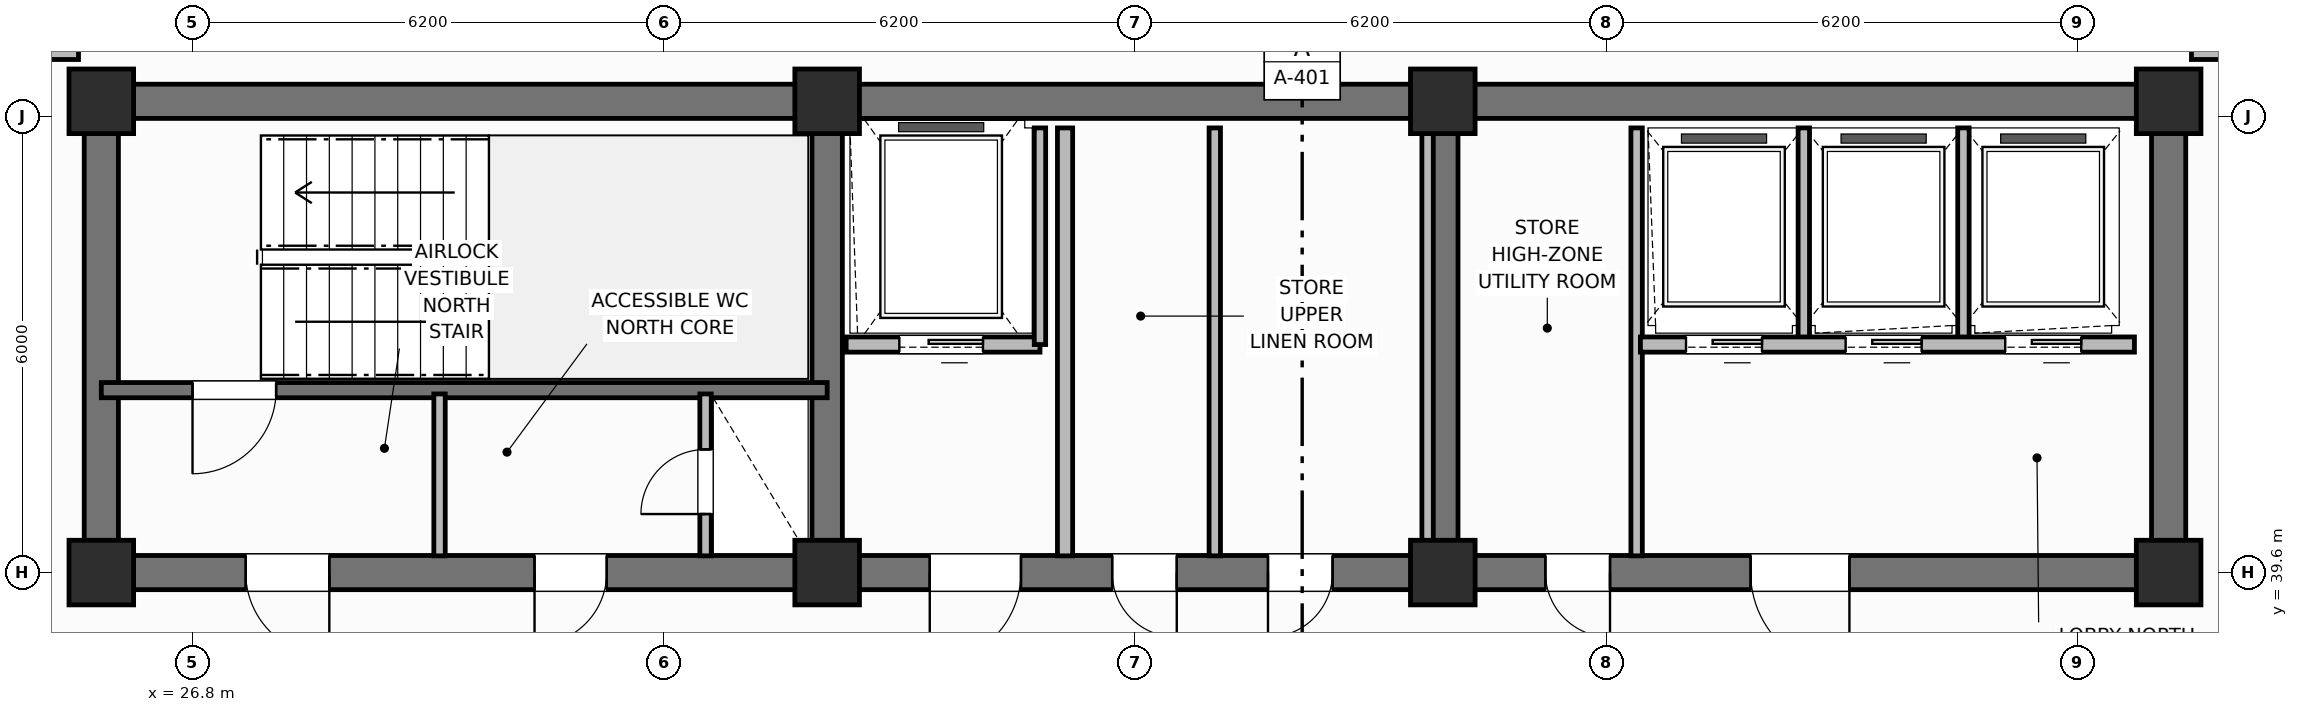
"""IFC4 building model, lengths in metres.
Left out: names, types, materials, properties, quantities, classifications, styles, units other than length and angle.
Written with IfcOpenShell. Run it as: python <this file> out.ifc"""

import sys

from ifc_helpers import new_model, si_unit, direction, frame, frame_2d, origin, origin_2d, place, context, subcontext, project, spatial, rectangle, extrude, element, fill, save


model = new_model("IFC4")
c1 = context("Model", 3, precision=1e-05, world=origin(), true_north=direction((0.0, 1.0)))
c2 = subcontext(c1, "Body", "Model", "MODEL_VIEW")
j1 = project(units=[si_unit("LENGTHUNIT", "METRE"), si_unit("PLANEANGLEUNIT", "RADIAN")], contexts=[c1])
p1 = place(None, origin())
s1 = spatial("IfcSite", under=j1, at=p1, CompositionType="ELEMENT")
p2 = place(p1, origin())
s2 = spatial("IfcBuilding", under=s1, at=p2, CompositionType="ELEMENT")
p3 = place(p2, frame((0.0, 0.0, 251.7)))
s3 = spatial("IfcBuildingStorey", under=s2, at=p3, CompositionType="ELEMENT", Elevation=251.7)
p4 = place(p3, frame((25.6, 45.8, 0.0), z_axis=(0.0, 0.0, 1.0), x_axis=(1.0, 0.0, 0.0)))
e1 = element("IfcWall", 1, at=p4, inside=s3, PredefinedType="SHEAR", context=c2, shape_type="SweptSolid", body=[
    extrude(rectangle(XDim=27.2, YDim=0.45, at=frame_2d((13.6, 0.0))), origin(), (0.0, 0.0, 1.0), 3.7),
])
for number, where, z_axis, x_axis in (
    (2, (25.6, 39.825, 0.0), (0.0, 0.0, 1.0), (0.0, 1.0, 0.0)),
    (3, (52.8, 39.825, 0.0), (0.0, 0.0, 1.0), (0.0, 1.0, 0.0)),
):
    element("IfcWall", number, at=place(p3, frame(where, z_axis=z_axis, x_axis=x_axis)), inside=s3, PredefinedType="SHEAR", context=c2, shape_type="SweptSolid", body=[
        extrude(rectangle(XDim=5.75, YDim=0.45, at=frame_2d((2.875, 0.0))), origin(), (0.0, 0.0, 1.0), 3.7),
    ])
p5 = place(p3, frame((52.8, 39.6, 0.0), z_axis=(0.0, 0.0, 1.0), x_axis=(-1.0, 0.0, 0.0)))
e4 = element("IfcWall", 4, at=p5, inside=s3, PredefinedType="SHEAR", context=c2, shape_type="SweptSolid", body=[
    extrude(rectangle(XDim=27.2, YDim=0.45, at=frame_2d((13.6, 0.0))), origin(), (0.0, 0.0, 1.0), 3.7),
])
p6 = place(p5, frame((24.2, 0.0, 0.0)))
e5 = element("IfcOpeningElement", 5, at=p6, cuts=e4, PredefinedType="OPENING", context=c2, shape_type="SweptSolid", body=[
    extrude(rectangle(XDim=1.1, YDim=2.15, at=frame_2d((0.55, 1.075))), frame((0.0, 0.235, 0.0), z_axis=(0.0, -1.0, 0.0), x_axis=(1.0, 0.0, 0.0)), (0.0, 0.0, 1.0), 0.47),
])
p7 = place(p5, frame((20.55, 0.0, 0.0)))
e6 = element("IfcOpeningElement", 6, at=p7, cuts=e4, PredefinedType="OPENING", context=c2, shape_type="SweptSolid", body=[
    extrude(rectangle(XDim=0.95, YDim=2.1, at=frame_2d((0.475, 1.05))), frame((0.0, 0.235, 0.0), z_axis=(0.0, -1.0, 0.0), x_axis=(1.0, 0.0, 0.0)), (0.0, 0.0, 1.0), 0.47),
])
p8 = place(p5, frame((15.1, 0.0, 0.0)))
e7 = element("IfcOpeningElement", 7, at=p8, cuts=e4, PredefinedType="OPENING", context=c2, shape_type="SweptSolid", body=[
    extrude(rectangle(XDim=1.2, YDim=2.15, at=frame_2d((0.6, 1.075))), frame((0.0, 0.235, 0.0), z_axis=(0.0, -1.0, 0.0), x_axis=(1.0, 0.0, 0.0)), (0.0, 0.0, 1.0), 0.47),
])
p9 = place(p5, frame((13.05, 0.0, 0.0)))
e8 = element("IfcOpeningElement", 8, at=p9, cuts=e4, PredefinedType="OPENING", context=c2, shape_type="SweptSolid", body=[
    extrude(rectangle(XDim=0.85, YDim=2.1, at=frame_2d((0.425, 1.05))), frame((0.0, 0.235, 0.0), z_axis=(0.0, -1.0, 0.0), x_axis=(1.0, 0.0, 0.0)), (0.0, 0.0, 1.0), 0.47),
])
p10 = place(p5, frame((11.0, 0.0, 0.0)))
e9 = element("IfcOpeningElement", 9, at=p10, cuts=e4, PredefinedType="OPENING", context=c2, shape_type="SweptSolid", body=[
    extrude(rectangle(XDim=0.85, YDim=2.1, at=frame_2d((0.425, 1.05))), frame((0.0, 0.235, 0.0), z_axis=(0.0, -1.0, 0.0), x_axis=(1.0, 0.0, 0.0)), (0.0, 0.0, 1.0), 0.47),
])
p11 = place(p5, frame((7.35, 0.0, 0.0)))
e10 = element("IfcOpeningElement", 10, at=p11, cuts=e4, PredefinedType="OPENING", context=c2, shape_type="SweptSolid", body=[
    extrude(rectangle(XDim=0.85, YDim=2.1, at=frame_2d((0.425, 1.05))), frame((0.0, 0.235, 0.0), z_axis=(0.0, -1.0, 0.0), x_axis=(1.0, 0.0, 0.0)), (0.0, 0.0, 1.0), 0.47),
])
p12 = place(p5, frame((4.2, 0.0, 0.0)))
e11 = element("IfcOpeningElement", 11, at=p12, cuts=e4, PredefinedType="OPENING", context=c2, shape_type="SweptSolid", body=[
    extrude(rectangle(XDim=1.3, YDim=2.2, at=frame_2d((0.65, 1.1))), frame((0.0, 0.235, 0.0), z_axis=(0.0, -1.0, 0.0), x_axis=(1.0, 0.0, 0.0)), (0.0, 0.0, 1.0), 0.47),
])
for number, where, z_axis, x_axis in (
    (12, (35.15, 39.825, 0.0), (0.0, 0.0, 1.0), (0.0, 1.0, 0.0)),
    (13, (43.25, 39.825, 0.0), (0.0, 0.0, 1.0), (0.0, 1.0, 0.0)),
):
    element("IfcWall", number, at=place(p3, frame(where, z_axis=z_axis, x_axis=x_axis)), inside=s3, PredefinedType="SHEAR", context=c2, shape_type="SweptSolid", body=[
        extrude(rectangle(XDim=5.75, YDim=0.4, at=frame_2d((2.875, 0.0))), origin(), (0.0, 0.0, 1.0), 3.7),
    ])
for number, where, z_axis, x_axis in (
    (14, (25.6, 39.6, 0.0), (0.0, 0.0, 1.0), (1.0, 0.0, 0.0)),
    (15, (25.6, 45.8, 0.0), (0.0, 0.0, 1.0), (1.0, 0.0, 0.0)),
    (16, (35.15, 39.6, 0.0), (0.0, 0.0, 1.0), (1.0, 0.0, 0.0)),
    (17, (35.15, 45.8, 0.0), (0.0, 0.0, 1.0), (1.0, 0.0, 0.0)),
    (18, (43.25, 39.6, 0.0), (0.0, 0.0, 1.0), (1.0, 0.0, 0.0)),
    (19, (43.25, 45.8, 0.0), (0.0, 0.0, 1.0), (1.0, 0.0, 0.0)),
    (20, (52.8, 39.6, 0.0), (0.0, 0.0, 1.0), (1.0, 0.0, 0.0)),
    (21, (52.8, 45.8, 0.0), (0.0, 0.0, 1.0), (1.0, 0.0, 0.0)),
):
    element("IfcColumn", number, at=place(p3, frame(where, z_axis=z_axis, x_axis=x_axis)), inside=s3, PredefinedType="COLUMN", context=c2, shape_type="SweptSolid", body=[
        extrude(rectangle(XDim=0.85, YDim=0.85, at=origin_2d()), origin(), (0.0, 0.0, 1.0), 3.7),
    ])
p13 = place(p3, frame((35.15, 42.0, 0.0), z_axis=(0.0, 0.0, 1.0), x_axis=(-1.0, 0.0, 0.0)))
e22 = element("IfcWall", 22, at=p13, inside=s3, PredefinedType="SHEAR", context=c2, shape_type="SweptSolid", body=[
    extrude(rectangle(XDim=9.55, YDim=0.2, at=frame_2d((4.775, 0.0))), origin(), (0.0, 0.0, 1.0), 3.7),
])
p14 = place(p13, frame((7.25, 0.0, 0.0)))
e23 = element("IfcOpeningElement", 23, at=p14, cuts=e22, PredefinedType="OPENING", context=c2, shape_type="SweptSolid", body=[
    extrude(rectangle(XDim=1.1, YDim=2.15, at=frame_2d((0.55, 1.075))), frame((0.0, 0.11, 0.0), z_axis=(0.0, -1.0, 0.0), x_axis=(1.0, 0.0, 0.0)), (0.0, 0.0, 1.0), 0.22),
])
p15 = place(p3, frame((33.55, 39.82, 0.0), z_axis=(0.0, 0.0, 1.0), x_axis=(0.0, 1.0, 0.0)))
e24 = element("IfcWall", 24, at=p15, inside=s3, PredefinedType="PARTITIONING", context=c2, shape_type="SweptSolid", body=[
    extrude(rectangle(XDim=2.13, YDim=0.15, at=frame_2d((1.065, 0.0))), origin(), (0.0, 0.0, 1.0), 2.56),
])
p16 = place(p15, frame((0.55, 0.0, 0.0)))
e25 = element("IfcOpeningElement", 25, at=p16, cuts=e24, PredefinedType="OPENING", context=c2, shape_type="SweptSolid", body=[
    extrude(rectangle(XDim=0.85, YDim=2.05, at=frame_2d((0.425, 1.025))), frame((0.0, 0.085, 0.0), z_axis=(0.0, -1.0, 0.0), x_axis=(1.0, 0.0, 0.0)), (0.0, 0.0, 1.0), 0.17),
])
p17 = place(p3, frame((30.05, 39.82, 0.0), z_axis=(0.0, 0.0, 1.0), x_axis=(0.0, 1.0, 0.0)))
e26 = element("IfcWall", 26, at=p17, inside=s3, PredefinedType="PARTITIONING", context=c2, shape_type="SweptSolid", body=[
    extrude(rectangle(XDim=2.13, YDim=0.15, at=frame_2d((1.065, 0.0))), origin(), (0.0, 0.0, 1.0), 2.56),
])
p18 = place(p3, frame((37.95, 42.6, 0.0), z_axis=(0.0, 0.0, 1.0), x_axis=(-1.0, 0.0, 0.0)))
e27 = element("IfcWall", 27, at=p18, inside=s3, PredefinedType="PARTITIONING", context=c2, shape_type="SweptSolid", body=[
    extrude(rectangle(XDim=2.55, YDim=0.2, at=frame_2d((1.275, 0.0))), origin(), (0.0, 0.0, 1.0), 2.33),
])
p19 = place(p18, frame((0.75, 0.0, 0.0)))
e28 = element("IfcOpeningElement", 28, at=p19, cuts=e27, PredefinedType="OPENING", context=c2, shape_type="SweptSolid", body=[
    extrude(rectangle(XDim=1.1, YDim=2.15, at=frame_2d((0.55, 1.075))), frame((0.0, 0.11, 0.0), z_axis=(0.0, -1.0, 0.0), x_axis=(1.0, 0.0, 0.0)), (0.0, 0.0, 1.0), 0.22),
])
p20 = place(p3, frame((37.95, 42.6, 0.0), z_axis=(0.0, 0.0, 1.0), x_axis=(0.0, 1.0, 0.0)))
e29 = element("IfcWall", 29, at=p20, inside=s3, PredefinedType="PARTITIONING", context=c2, shape_type="SweptSolid", body=[
    extrude(rectangle(XDim=2.85, YDim=0.15, at=frame_2d((1.425, 0.0))), origin(), (0.0, 0.0, 1.0), 2.56),
])
p21 = place(p3, frame((38.28, 39.82, 0.0), z_axis=(0.0, 0.0, 1.0), x_axis=(0.0, 1.0, 0.0)))
e30 = element("IfcWall", 30, at=p21, inside=s3, PredefinedType="PARTITIONING", context=c2, shape_type="SweptSolid", body=[
    extrude(rectangle(XDim=5.63, YDim=0.2, at=frame_2d((2.815, 0.0))), origin(), (0.0, 0.0, 1.0), 2.56),
])
for number, where, z_axis, x_axis in (
    (31, (43.05, 39.82, 0.0), (0.0, 0.0, 1.0), (0.0, 1.0, 0.0)),
    (32, (40.25, 39.82, 0.0), (0.0, 0.0, 1.0), (0.0, 1.0, 0.0)),
    (33, (45.8, 39.82, 0.0), (0.0, 0.0, 1.0), (0.0, 1.0, 0.0)),
):
    element("IfcWall", number, at=place(p3, frame(where, z_axis=z_axis, x_axis=x_axis)), inside=s3, PredefinedType="PARTITIONING", context=c2, shape_type="SweptSolid", body=[
        extrude(rectangle(XDim=5.63, YDim=0.15, at=frame_2d((2.815, 0.0))), origin(), (0.0, 0.0, 1.0), 2.56),
    ])
for number, where, z_axis, x_axis in (
    (34, (48.0, 42.65, 0.0), (0.0, 0.0, 1.0), (0.0, 1.0, 0.0)),
    (35, (50.1, 42.65, 0.0), (0.0, 0.0, 1.0), (0.0, 1.0, 0.0)),
):
    element("IfcWall", number, at=place(p3, frame(where, z_axis=z_axis, x_axis=x_axis)), inside=s3, PredefinedType="PARTITIONING", context=c2, shape_type="SweptSolid", body=[
        extrude(rectangle(XDim=2.8, YDim=0.15, at=frame_2d((1.4, 0.0))), origin(), (0.0, 0.0, 1.0), 2.56),
    ])
p22 = place(p3, frame((52.35, 42.6, 0.0), z_axis=(0.0, 0.0, 1.0), x_axis=(-1.0, 0.0, 0.0)))
e36 = element("IfcWall", 36, at=p22, inside=s3, PredefinedType="PARTITIONING", context=c2, shape_type="SweptSolid", body=[
    extrude(rectangle(XDim=6.5, YDim=0.2, at=frame_2d((3.25, 0.0))), origin(), (0.0, 0.0, 1.0), 2.56),
])
p23 = place(p22, frame((4.9, 0.0, 0.0)))
e37 = element("IfcOpeningElement", 37, at=p23, cuts=e36, PredefinedType="OPENING", context=c2, shape_type="SweptSolid", body=[
    extrude(rectangle(XDim=1.0, YDim=2.15, at=frame_2d((0.5, 1.075))), frame((0.0, 0.11, 0.0), z_axis=(0.0, -1.0, 0.0), x_axis=(1.0, 0.0, 0.0)), (0.0, 0.0, 1.0), 0.22),
])
p24 = place(p22, frame((2.8, 0.0, 0.0)))
e38 = element("IfcOpeningElement", 38, at=p24, cuts=e36, PredefinedType="OPENING", context=c2, shape_type="SweptSolid", body=[
    extrude(rectangle(XDim=1.0, YDim=2.15, at=frame_2d((0.5, 1.075))), frame((0.0, 0.11, 0.0), z_axis=(0.0, -1.0, 0.0), x_axis=(1.0, 0.0, 0.0)), (0.0, 0.0, 1.0), 0.22),
])
p25 = place(p22, frame((0.7, 0.0, 0.0)))
e39 = element("IfcOpeningElement", 39, at=p25, cuts=e36, PredefinedType="OPENING", context=c2, shape_type="SweptSolid", body=[
    extrude(rectangle(XDim=1.0, YDim=2.15, at=frame_2d((0.5, 1.075))), frame((0.0, 0.11, 0.0), z_axis=(0.0, -1.0, 0.0), x_axis=(1.0, 0.0, 0.0)), (0.0, 0.0, 1.0), 0.22),
])
p26 = place(p3, frame((21.546, 46.45, 0.0), z_axis=(0.0, 0.0, 1.0), x_axis=(1.0, 0.0, 0.0)))
e40 = element("IfcWall", 40, at=p26, inside=s3, PredefinedType="PARTITIONING", context=c2, shape_type="SweptSolid", body=[
    extrude(rectangle(XDim=3.754, YDim=0.2, at=frame_2d((1.877, 0.0))), origin(), (0.0, 0.0, 1.0), 2.56),
])
p27 = place(p3, frame((53.1, 46.45, 0.0), z_axis=(0.0, 0.0, 1.0), x_axis=(1.0, 0.0, 0.0)))
e41 = element("IfcWall", 41, at=p27, inside=s3, PredefinedType="PARTITIONING", context=c2, shape_type="SweptSolid", body=[
    extrude(rectangle(XDim=3.754, YDim=0.2, at=frame_2d((1.877, 0.0))), origin(), (0.0, 0.0, 1.0), 2.56),
])
p28 = place(p14, origin())
e42 = element("IfcDoor", 42, at=p28, inside=s3, OperationType="SINGLE_SWING_RIGHT", PredefinedType="DOOR", context=c2, shape_type="SweptSolid", body=[
    extrude(rectangle(XDim=1.1, YDim=2.15, at=frame_2d((0.55, 1.075))), frame((0.0, 0.025, 0.0), z_axis=(0.0, -1.0, 0.0), x_axis=(1.0, 0.0, 0.0)), (0.0, 0.0, 1.0), 0.05),
])
fill(e23, e42)
p29 = place(p16, origin())
e43 = element("IfcDoor", 43, at=p29, inside=s3, OperationType="SINGLE_SWING_LEFT", PredefinedType="TRAPDOOR", context=c2, shape_type="SweptSolid", body=[
    extrude(rectangle(XDim=0.85, YDim=2.05, at=frame_2d((0.425, 1.025))), frame((0.0, 0.025, 0.0), z_axis=(0.0, -1.0, 0.0), x_axis=(1.0, 0.0, 0.0)), (0.0, 0.0, 1.0), 0.05),
])
fill(e25, e43)
p30 = place(p19, origin())
e44 = element("IfcDoor", 44, at=p30, inside=s3, OperationType="SLIDING_TO_LEFT", PredefinedType="DOOR", context=c2, shape_type="SweptSolid", body=[
    extrude(rectangle(XDim=1.1, YDim=2.15, at=frame_2d((0.55, 1.075))), frame((0.0, 0.025, 0.0), z_axis=(0.0, -1.0, 0.0), x_axis=(1.0, 0.0, 0.0)), (0.0, 0.0, 1.0), 0.05),
])
fill(e28, e44)
p31 = place(p23, origin())
e45 = element("IfcDoor", 45, at=p31, inside=s3, OperationType="SLIDING_TO_LEFT", PredefinedType="DOOR", context=c2, shape_type="SweptSolid", body=[
    extrude(rectangle(XDim=1.0, YDim=2.15, at=frame_2d((0.5, 1.075))), frame((0.0, 0.025, 0.0), z_axis=(0.0, -1.0, 0.0), x_axis=(1.0, 0.0, 0.0)), (0.0, 0.0, 1.0), 0.05),
])
fill(e37, e45)
p32 = place(p24, origin())
e46 = element("IfcDoor", 46, at=p32, inside=s3, OperationType="SLIDING_TO_LEFT", PredefinedType="DOOR", context=c2, shape_type="SweptSolid", body=[
    extrude(rectangle(XDim=1.0, YDim=2.15, at=frame_2d((0.5, 1.075))), frame((0.0, 0.025, 0.0), z_axis=(0.0, -1.0, 0.0), x_axis=(1.0, 0.0, 0.0)), (0.0, 0.0, 1.0), 0.05),
])
fill(e38, e46)
p33 = place(p25, origin())
e47 = element("IfcDoor", 47, at=p33, inside=s3, OperationType="SLIDING_TO_LEFT", PredefinedType="DOOR", context=c2, shape_type="SweptSolid", body=[
    extrude(rectangle(XDim=1.0, YDim=2.15, at=frame_2d((0.5, 1.075))), frame((0.0, 0.025, 0.0), z_axis=(0.0, -1.0, 0.0), x_axis=(1.0, 0.0, 0.0)), (0.0, 0.0, 1.0), 0.05),
])
fill(e39, e47)
p34 = place(p6, origin())
e48 = element("IfcDoor", 48, at=p34, inside=s3, OperationType="SINGLE_SWING_LEFT", PredefinedType="DOOR", context=c2, shape_type="SweptSolid", body=[
    extrude(rectangle(XDim=1.1, YDim=2.15, at=frame_2d((0.55, 1.075))), frame((0.0, 0.025, 0.0), z_axis=(0.0, -1.0, 0.0), x_axis=(1.0, 0.0, 0.0)), (0.0, 0.0, 1.0), 0.05),
])
fill(e5, e48)
p35 = place(p7, origin())
e49 = element("IfcDoor", 49, at=p35, inside=s3, OperationType="SINGLE_SWING_RIGHT", PredefinedType="DOOR", context=c2, shape_type="SweptSolid", body=[
    extrude(rectangle(XDim=0.95, YDim=2.1, at=frame_2d((0.475, 1.05))), frame((0.0, 0.025, 0.0), z_axis=(0.0, -1.0, 0.0), x_axis=(1.0, 0.0, 0.0)), (0.0, 0.0, 1.0), 0.05),
])
fill(e6, e49)
p36 = place(p8, origin())
e50 = element("IfcDoor", 50, at=p36, inside=s3, OperationType="SINGLE_SWING_RIGHT", PredefinedType="DOOR", context=c2, shape_type="SweptSolid", body=[
    extrude(rectangle(XDim=1.2, YDim=2.15, at=frame_2d((0.6, 1.075))), frame((0.0, 0.025, 0.0), z_axis=(0.0, -1.0, 0.0), x_axis=(1.0, 0.0, 0.0)), (0.0, 0.0, 1.0), 0.05),
])
fill(e7, e50)
p37 = place(p9, origin())
e51 = element("IfcDoor", 51, at=p37, inside=s3, OperationType="SINGLE_SWING_LEFT", PredefinedType="DOOR", context=c2, shape_type="SweptSolid", body=[
    extrude(rectangle(XDim=0.85, YDim=2.1, at=frame_2d((0.425, 1.05))), frame((0.0, 0.025, 0.0), z_axis=(0.0, -1.0, 0.0), x_axis=(1.0, 0.0, 0.0)), (0.0, 0.0, 1.0), 0.05),
])
fill(e8, e51)
p38 = place(p10, origin())
e52 = element("IfcDoor", 52, at=p38, inside=s3, OperationType="SINGLE_SWING_RIGHT", PredefinedType="DOOR", context=c2, shape_type="SweptSolid", body=[
    extrude(rectangle(XDim=0.85, YDim=2.1, at=frame_2d((0.425, 1.05))), frame((0.0, 0.025, 0.0), z_axis=(0.0, -1.0, 0.0), x_axis=(1.0, 0.0, 0.0)), (0.0, 0.0, 1.0), 0.05),
])
fill(e9, e52)
p39 = place(p11, origin())
e53 = element("IfcDoor", 53, at=p39, inside=s3, OperationType="SINGLE_SWING_LEFT", PredefinedType="DOOR", context=c2, shape_type="SweptSolid", body=[
    extrude(rectangle(XDim=0.85, YDim=2.1, at=frame_2d((0.425, 1.05))), frame((0.0, 0.025, 0.0), z_axis=(0.0, -1.0, 0.0), x_axis=(1.0, 0.0, 0.0)), (0.0, 0.0, 1.0), 0.05),
])
fill(e10, e53)
p40 = place(p12, origin())
e54 = element("IfcDoor", 54, at=p40, inside=s3, OperationType="SINGLE_SWING_LEFT", PredefinedType="DOOR", context=c2, shape_type="SweptSolid", body=[
    extrude(rectangle(XDim=1.3, YDim=2.2, at=frame_2d((0.65, 1.1))), frame((0.0, 0.025, 0.0), z_axis=(0.0, -1.0, 0.0), x_axis=(1.0, 0.0, 0.0)), (0.0, 0.0, 1.0), 0.05),
])
fill(e11, e54)
save(model, sys.argv[1])
